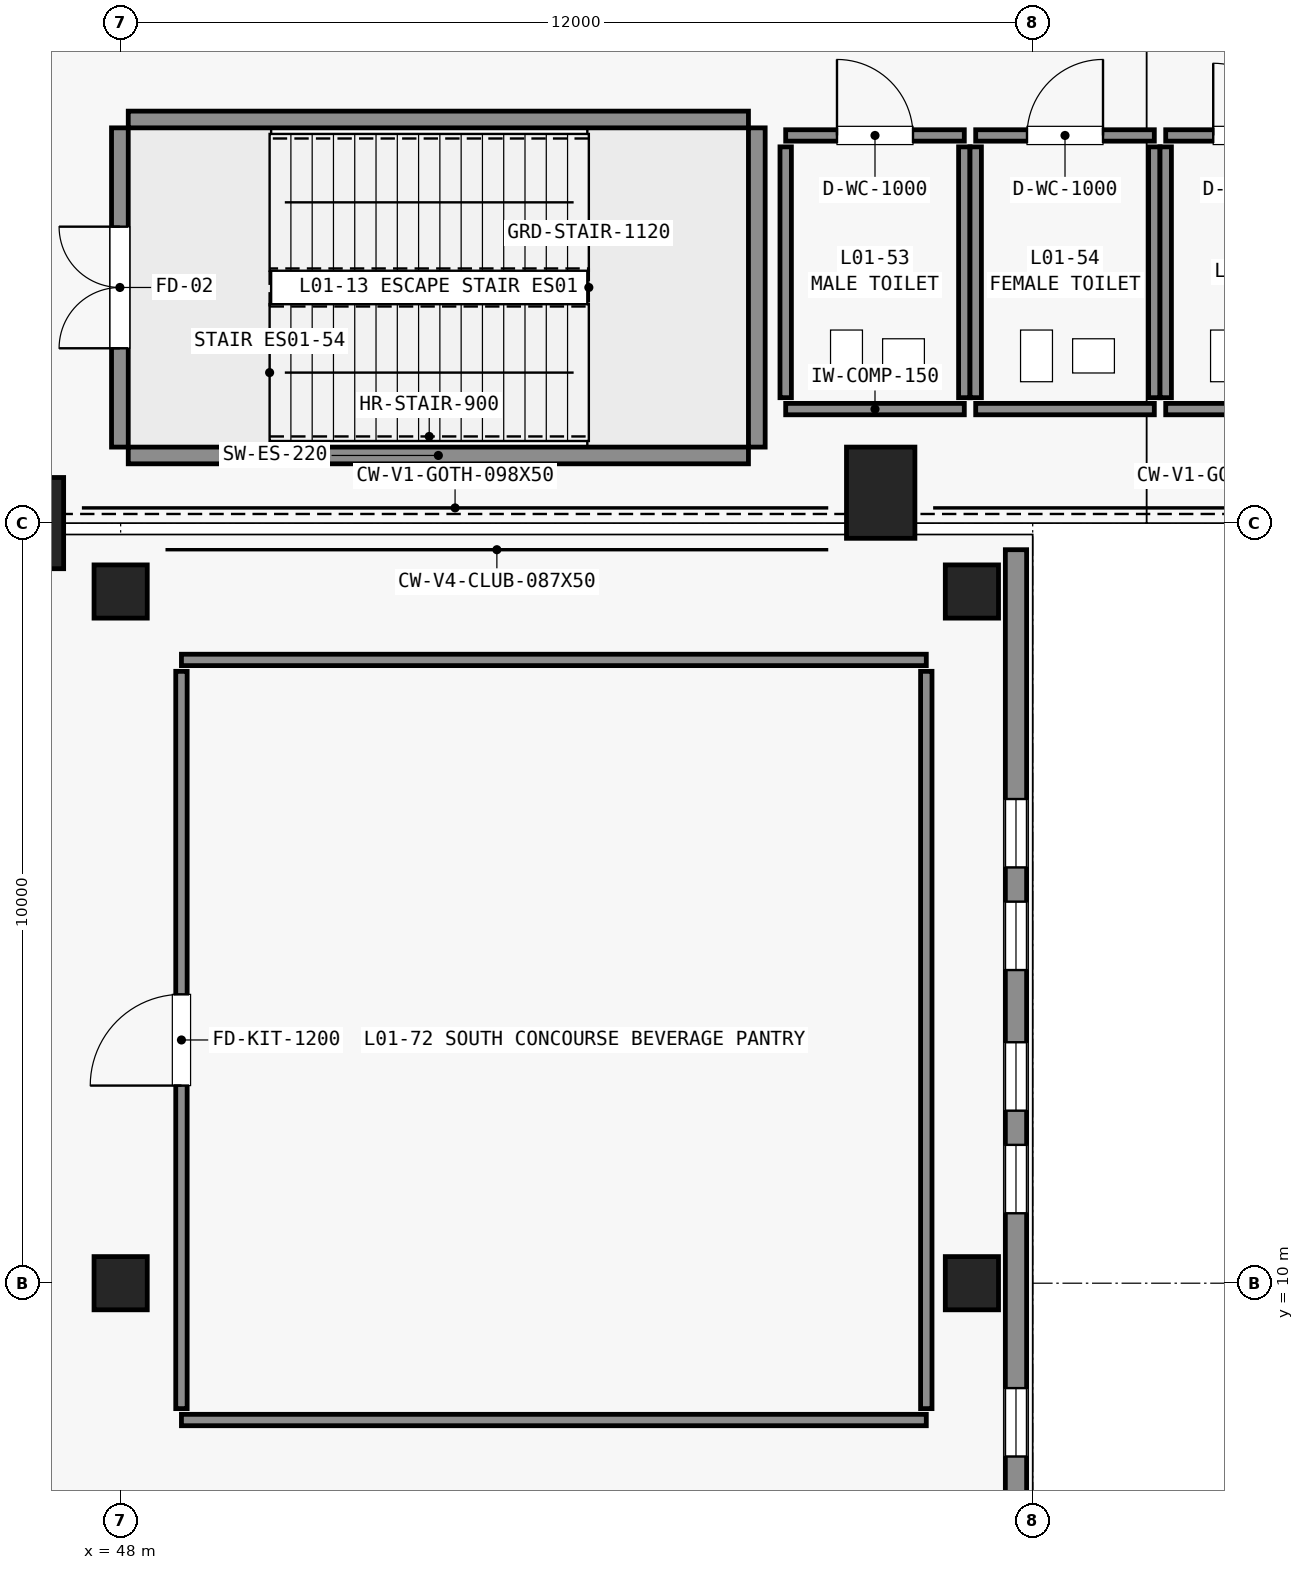
"""IFC4 building model, lengths in metres.
Left out: names, types, materials, properties, quantities, classifications, styles, units other than length and angle.
Written with IfcOpenShell. Run it as: python <this file> out.ifc"""

import sys

from ifc_helpers import new_model, si_unit, direction, frame, frame_2d, origin, origin_2d, place, context, subcontext, project, spatial, rectangle, extrude, element, fill, save


model = new_model("IFC4")
c1 = context("Model", 3, precision=1e-05, world=origin(), true_north=direction((0.0, 1.0)))
c2 = subcontext(c1, "Body", "Model", "MODEL_VIEW")
j1 = project(units=[si_unit("LENGTHUNIT", "METRE"), si_unit("PLANEANGLEUNIT", "RADIAN")], contexts=[c1])
p1 = place(None, origin())
s1 = spatial("IfcSite", under=j1, at=p1, CompositionType="ELEMENT")
p2 = place(p1, origin())
s2 = spatial("IfcBuilding", under=s1, at=p2, CompositionType="ELEMENT")
p3 = place(p2, frame((0.0, 0.0, 6.0)))
s3 = spatial("IfcBuildingStorey", under=s2, at=p3, CompositionType="ELEMENT", Elevation=6.0)
for number, where, z_axis, x_axis in (
    (1, (58.0, 20.4, 0.0), (0.0, 0.0, 1.0), (1.0, 0.0, 0.0)),
    (2, (46.8, 20.0, 0.0), (0.0, 0.0, 1.0), (1.0, 0.0, 0.0)),
):
    element("IfcColumn", number, at=place(p3, frame(where, z_axis=z_axis, x_axis=x_axis)), inside=s3, PredefinedType="PILASTER", context=c2, shape_type="SweptSolid", body=[
        extrude(rectangle(XDim=0.9, YDim=1.2, at=origin_2d()), origin(), (0.0, 0.0, 1.0), 5.4),
    ])
for number, where, z_axis, x_axis in (
    (3, (48.0, 10.0, 0.0), (0.0, 0.0, 1.0), (1.0, 0.0, 0.0)),
    (4, (48.0, 19.1, 0.0), (0.0, 0.0, 1.0), (1.0, 0.0, 0.0)),
    (5, (59.2, 10.0, 0.0), (0.0, 0.0, 1.0), (1.0, 0.0, 0.0)),
    (6, (59.2, 19.1, 0.0), (0.0, 0.0, 1.0), (1.0, 0.0, 0.0)),
):
    element("IfcColumn", number, at=place(p3, frame(where, z_axis=z_axis, x_axis=x_axis)), inside=s3, PredefinedType="COLUMN", context=c2, shape_type="SweptSolid", body=[
        extrude(rectangle(XDim=0.7, YDim=0.7, at=origin_2d()), origin(), (0.0, 0.0, 1.0), 5.4),
    ])
p4 = place(p3, frame((59.78, 0.22, 0.0), z_axis=(0.0, 0.0, 1.0), x_axis=(0.0, 1.0, 0.0)))
e7 = element("IfcWall", 7, at=p4, inside=s3, PredefinedType="STANDARD", context=c2, shape_type="SweptSolid", body=[
    extrude(rectangle(XDim=19.43, YDim=0.28, at=frame_2d((9.715, 0.0))), origin(), (0.0, 0.0, 1.0), 5.04),
])
p5 = place(p4, frame((2.45, 0.0, 0.95)))
e8 = element("IfcOpeningElement", 8, at=p5, cuts=e7, PredefinedType="OPENING", context=c2, shape_type="SweptSolid", body=[
    extrude(rectangle(XDim=0.9, YDim=2.85, at=frame_2d((0.45, 1.425))), frame((0.0, 0.15, 0.0), z_axis=(0.0, -1.0, 0.0), x_axis=(1.0, 0.0, 0.0)), (0.0, 0.0, 1.0), 0.3),
])
p6 = place(p4, frame((4.3, 0.0, 0.95)))
e9 = element("IfcOpeningElement", 9, at=p6, cuts=e7, PredefinedType="OPENING", context=c2, shape_type="SweptSolid", body=[
    extrude(rectangle(XDim=0.9, YDim=2.85, at=frame_2d((0.45, 1.425))), frame((0.0, 0.15, 0.0), z_axis=(0.0, -1.0, 0.0), x_axis=(1.0, 0.0, 0.0)), (0.0, 0.0, 1.0), 0.3),
])
p7 = place(p4, frame((5.65, 0.0, 0.95)))
e10 = element("IfcOpeningElement", 10, at=p7, cuts=e7, PredefinedType="OPENING", context=c2, shape_type="SweptSolid", body=[
    extrude(rectangle(XDim=0.9, YDim=2.85, at=frame_2d((0.45, 1.425))), frame((0.0, 0.15, 0.0), z_axis=(0.0, -1.0, 0.0), x_axis=(1.0, 0.0, 0.0)), (0.0, 0.0, 1.0), 0.3),
])
p8 = place(p4, frame((7.5, 0.0, 0.95)))
e11 = element("IfcOpeningElement", 11, at=p8, cuts=e7, PredefinedType="OPENING", context=c2, shape_type="SweptSolid", body=[
    extrude(rectangle(XDim=0.9, YDim=2.85, at=frame_2d((0.45, 1.425))), frame((0.0, 0.15, 0.0), z_axis=(0.0, -1.0, 0.0), x_axis=(1.0, 0.0, 0.0)), (0.0, 0.0, 1.0), 0.3),
])
p9 = place(p4, frame((10.7, 0.0, 0.95)))
e12 = element("IfcOpeningElement", 12, at=p9, cuts=e7, PredefinedType="OPENING", context=c2, shape_type="SweptSolid", body=[
    extrude(rectangle(XDim=0.9, YDim=2.85, at=frame_2d((0.45, 1.425))), frame((0.0, 0.15, 0.0), z_axis=(0.0, -1.0, 0.0), x_axis=(1.0, 0.0, 0.0)), (0.0, 0.0, 1.0), 0.3),
])
p10 = place(p4, frame((12.05, 0.0, 0.95)))
e13 = element("IfcOpeningElement", 13, at=p10, cuts=e7, PredefinedType="OPENING", context=c2, shape_type="SweptSolid", body=[
    extrude(rectangle(XDim=0.9, YDim=2.85, at=frame_2d((0.45, 1.425))), frame((0.0, 0.15, 0.0), z_axis=(0.0, -1.0, 0.0), x_axis=(1.0, 0.0, 0.0)), (0.0, 0.0, 1.0), 0.3),
])
p11 = place(p4, frame((13.9, 0.0, 0.95)))
e14 = element("IfcOpeningElement", 14, at=p11, cuts=e7, PredefinedType="OPENING", context=c2, shape_type="SweptSolid", body=[
    extrude(rectangle(XDim=0.9, YDim=2.85, at=frame_2d((0.45, 1.425))), frame((0.0, 0.15, 0.0), z_axis=(0.0, -1.0, 0.0), x_axis=(1.0, 0.0, 0.0)), (0.0, 0.0, 1.0), 0.3),
])
p12 = place(p4, frame((15.25, 0.0, 0.95)))
e15 = element("IfcOpeningElement", 15, at=p12, cuts=e7, PredefinedType="OPENING", context=c2, shape_type="SweptSolid", body=[
    extrude(rectangle(XDim=0.9, YDim=2.85, at=frame_2d((0.45, 1.425))), frame((0.0, 0.15, 0.0), z_axis=(0.0, -1.0, 0.0), x_axis=(1.0, 0.0, 0.0)), (0.0, 0.0, 1.0), 0.3),
])
for number, where, z_axis, x_axis in (
    (16, (48.1, 20.89, 0.0), (0.0, 0.0, 1.0), (1.0, 0.0, 0.0)),
    (17, (48.1, 25.31, 0.0), (0.0, 0.0, 1.0), (1.0, 0.0, 0.0)),
):
    element("IfcWall", number, at=place(p3, frame(where, z_axis=z_axis, x_axis=x_axis)), inside=s3, PredefinedType="SHEAR", context=c2, shape_type="SweptSolid", body=[
        extrude(rectangle(XDim=8.16, YDim=0.22, at=frame_2d((4.08, 0.0))), origin(), (0.0, 0.0, 1.0), 5.4),
    ])
p13 = place(p3, frame((47.99, 21.0, 0.0), z_axis=(0.0, 0.0, 1.0), x_axis=(0.0, 1.0, 0.0)))
e18 = element("IfcWall", 18, at=p13, inside=s3, PredefinedType="SHEAR", context=c2, shape_type="SweptSolid", body=[
    extrude(rectangle(XDim=4.2, YDim=0.22, at=frame_2d((2.1, 0.0))), origin(), (0.0, 0.0, 1.0), 5.4),
])
p14 = place(p13, frame((1.3, 0.0, 0.0)))
e19 = element("IfcOpeningElement", 19, at=p14, cuts=e18, PredefinedType="OPENING", context=c2, shape_type="SweptSolid", body=[
    extrude(rectangle(XDim=1.6, YDim=2.2, at=frame_2d((0.8, 1.1))), frame((0.0, 0.12, 0.0), z_axis=(0.0, -1.0, 0.0), x_axis=(1.0, 0.0, 0.0)), (0.0, 0.0, 1.0), 0.24),
])
p15 = place(p3, frame((56.37, 21.0, 0.0), z_axis=(0.0, 0.0, 1.0), x_axis=(0.0, 1.0, 0.0)))
e20 = element("IfcWall", 20, at=p15, inside=s3, PredefinedType="SHEAR", context=c2, shape_type="SweptSolid", body=[
    extrude(rectangle(XDim=4.2, YDim=0.22, at=frame_2d((2.1, 0.0))), origin(), (0.0, 0.0, 1.0), 5.4),
])
p16 = place(p3, frame((56.75, 21.5, 0.0), z_axis=(0.0, 0.0, 1.0), x_axis=(1.0, 0.0, 0.0)))
e21 = element("IfcWall", 21, at=p16, inside=s3, PredefinedType="STANDARD", context=c2, shape_type="SweptSolid", body=[
    extrude(rectangle(XDim=2.35, YDim=0.15, at=frame_2d((1.175, 0.0))), origin(), (0.0, 0.0, 1.0), 5.04),
])
p17 = place(p3, frame((56.75, 25.1, 0.0), z_axis=(0.0, 0.0, 1.0), x_axis=(1.0, 0.0, 0.0)))
e22 = element("IfcWall", 22, at=p17, inside=s3, PredefinedType="STANDARD", context=c2, shape_type="SweptSolid", body=[
    extrude(rectangle(XDim=2.35, YDim=0.15, at=frame_2d((1.175, 0.0))), origin(), (0.0, 0.0, 1.0), 5.04),
])
p18 = place(p17, frame((0.675, 0.0, 0.0)))
e23 = element("IfcOpeningElement", 23, at=p18, cuts=e22, PredefinedType="OPENING", context=c2, shape_type="SweptSolid", body=[
    extrude(rectangle(XDim=1.0, YDim=2.15, at=frame_2d((0.5, 1.075))), frame((0.0, 0.085, 0.0), z_axis=(0.0, -1.0, 0.0), x_axis=(1.0, 0.0, 0.0)), (0.0, 0.0, 1.0), 0.17),
])
for number, where, z_axis, x_axis in (
    (24, (56.75, 21.65, 0.0), (0.0, 0.0, 1.0), (0.0, 1.0, 0.0)),
    (25, (59.1, 21.65, 0.0), (0.0, 0.0, 1.0), (0.0, 1.0, 0.0)),
):
    element("IfcWall", number, at=place(p3, frame(where, z_axis=z_axis, x_axis=x_axis)), inside=s3, PredefinedType="STANDARD", context=c2, shape_type="SweptSolid", body=[
        extrude(rectangle(XDim=3.3, YDim=0.15, at=frame_2d((1.65, 0.0))), origin(), (0.0, 0.0, 1.0), 5.04),
    ])
p19 = place(p3, frame((59.25, 21.5, 0.0), z_axis=(0.0, 0.0, 1.0), x_axis=(1.0, 0.0, 0.0)))
e26 = element("IfcWall", 26, at=p19, inside=s3, PredefinedType="STANDARD", context=c2, shape_type="SweptSolid", body=[
    extrude(rectangle(XDim=2.35, YDim=0.15, at=frame_2d((1.175, 0.0))), origin(), (0.0, 0.0, 1.0), 5.04),
])
p20 = place(p3, frame((59.25, 25.1, 0.0), z_axis=(0.0, 0.0, 1.0), x_axis=(1.0, 0.0, 0.0)))
e27 = element("IfcWall", 27, at=p20, inside=s3, PredefinedType="STANDARD", context=c2, shape_type="SweptSolid", body=[
    extrude(rectangle(XDim=2.35, YDim=0.15, at=frame_2d((1.175, 0.0))), origin(), (0.0, 0.0, 1.0), 5.04),
])
p21 = place(p20, frame((0.675, 0.0, 0.0)))
e28 = element("IfcOpeningElement", 28, at=p21, cuts=e27, PredefinedType="OPENING", context=c2, shape_type="SweptSolid", body=[
    extrude(rectangle(XDim=1.0, YDim=2.15, at=frame_2d((0.5, 1.075))), frame((0.0, 0.085, 0.0), z_axis=(0.0, -1.0, 0.0), x_axis=(1.0, 0.0, 0.0)), (0.0, 0.0, 1.0), 0.17),
])
for number, where, z_axis, x_axis in (
    (29, (59.25, 21.65, 0.0), (0.0, 0.0, 1.0), (0.0, 1.0, 0.0)),
    (30, (61.6, 21.65, 0.0), (0.0, 0.0, 1.0), (0.0, 1.0, 0.0)),
):
    element("IfcWall", number, at=place(p3, frame(where, z_axis=z_axis, x_axis=x_axis)), inside=s3, PredefinedType="STANDARD", context=c2, shape_type="SweptSolid", body=[
        extrude(rectangle(XDim=3.3, YDim=0.15, at=frame_2d((1.65, 0.0))), origin(), (0.0, 0.0, 1.0), 5.04),
    ])
p22 = place(p3, frame((61.75, 21.5, 0.0), z_axis=(0.0, 0.0, 1.0), x_axis=(1.0, 0.0, 0.0)))
e31 = element("IfcWall", 31, at=p22, inside=s3, PredefinedType="STANDARD", context=c2, shape_type="SweptSolid", body=[
    extrude(rectangle(XDim=2.2, YDim=0.15, at=frame_2d((1.1, 0.0))), origin(), (0.0, 0.0, 1.0), 5.04),
])
p23 = place(p3, frame((61.75, 25.1, 0.0), z_axis=(0.0, 0.0, 1.0), x_axis=(1.0, 0.0, 0.0)))
e32 = element("IfcWall", 32, at=p23, inside=s3, PredefinedType="STANDARD", context=c2, shape_type="SweptSolid", body=[
    extrude(rectangle(XDim=2.2, YDim=0.15, at=frame_2d((1.1, 0.0))), origin(), (0.0, 0.0, 1.0), 5.04),
])
p24 = place(p23, frame((0.625, 0.0, 0.0)))
e33 = element("IfcOpeningElement", 33, at=p24, cuts=e32, PredefinedType="OPENING", context=c2, shape_type="SweptSolid", body=[
    extrude(rectangle(XDim=0.95, YDim=2.15, at=frame_2d((0.475, 1.075))), frame((0.0, 0.085, 0.0), z_axis=(0.0, -1.0, 0.0), x_axis=(1.0, 0.0, 0.0)), (0.0, 0.0, 1.0), 0.17),
])
p25 = place(p3, frame((61.75, 21.65, 0.0), z_axis=(0.0, 0.0, 1.0), x_axis=(0.0, 1.0, 0.0)))
e34 = element("IfcWall", 34, at=p25, inside=s3, PredefinedType="STANDARD", context=c2, shape_type="SweptSolid", body=[
    extrude(rectangle(XDim=3.3, YDim=0.15, at=frame_2d((1.65, 0.0))), origin(), (0.0, 0.0, 1.0), 5.04),
])
for number, where, z_axis, x_axis in (
    (35, (48.8, 8.2, 0.0), (0.0, 0.0, 1.0), (1.0, 0.0, 0.0)),
    (36, (48.8, 18.2, 0.0), (0.0, 0.0, 1.0), (1.0, 0.0, 0.0)),
):
    element("IfcWall", number, at=place(p3, frame(where, z_axis=z_axis, x_axis=x_axis)), inside=s3, PredefinedType="STANDARD", context=c2, shape_type="SweptSolid", body=[
        extrude(rectangle(XDim=9.8, YDim=0.15, at=frame_2d((4.9, 0.0))), origin(), (0.0, 0.0, 1.0), 4.29),
    ])
p26 = place(p3, frame((48.8, 8.35, 0.0), z_axis=(0.0, 0.0, 1.0), x_axis=(0.0, 1.0, 0.0)))
e37 = element("IfcWall", 37, at=p26, inside=s3, PredefinedType="STANDARD", context=c2, shape_type="SweptSolid", body=[
    extrude(rectangle(XDim=9.7, YDim=0.15, at=frame_2d((4.85, 0.0))), origin(), (0.0, 0.0, 1.0), 4.29),
])
p27 = place(p26, frame((4.25, 0.0, 0.0)))
e38 = element("IfcOpeningElement", 38, at=p27, cuts=e37, PredefinedType="OPENING", context=c2, shape_type="SweptSolid", body=[
    extrude(rectangle(XDim=1.2, YDim=2.2, at=frame_2d((0.6, 1.1))), frame((0.0, 0.085, 0.0), z_axis=(0.0, -1.0, 0.0), x_axis=(1.0, 0.0, 0.0)), (0.0, 0.0, 1.0), 0.17),
])
p28 = place(p3, frame((58.6, 8.35, 0.0), z_axis=(0.0, 0.0, 1.0), x_axis=(0.0, 1.0, 0.0)))
e39 = element("IfcWall", 39, at=p28, inside=s3, PredefinedType="STANDARD", context=c2, shape_type="SweptSolid", body=[
    extrude(rectangle(XDim=9.7, YDim=0.15, at=frame_2d((4.85, 0.0))), origin(), (0.0, 0.0, 1.0), 4.29),
])
p29 = place(p8, origin())
e40 = element("IfcWindow", 40, at=p29, inside=s3, PartitioningType="DOUBLE_PANEL_VERTICAL", PredefinedType="WINDOW", context=c2, shape_type="SweptSolid", body=[
    extrude(rectangle(XDim=0.9, YDim=2.85, at=frame_2d((0.45, 1.425))), frame((0.0, 0.03, 0.0), z_axis=(0.0, -1.0, 0.0), x_axis=(1.0, 0.0, 0.0)), (0.0, 0.0, 1.0), 0.06),
])
fill(e11, e40)
p30 = place(p9, origin())
e41 = element("IfcWindow", 41, at=p30, inside=s3, PartitioningType="DOUBLE_PANEL_VERTICAL", PredefinedType="WINDOW", context=c2, shape_type="SweptSolid", body=[
    extrude(rectangle(XDim=0.9, YDim=2.85, at=frame_2d((0.45, 1.425))), frame((0.0, 0.03, 0.0), z_axis=(0.0, -1.0, 0.0), x_axis=(1.0, 0.0, 0.0)), (0.0, 0.0, 1.0), 0.06),
])
fill(e12, e41)
p31 = place(p10, origin())
e42 = element("IfcWindow", 42, at=p31, inside=s3, PartitioningType="DOUBLE_PANEL_VERTICAL", PredefinedType="WINDOW", context=c2, shape_type="SweptSolid", body=[
    extrude(rectangle(XDim=0.9, YDim=2.85, at=frame_2d((0.45, 1.425))), frame((0.0, 0.03, 0.0), z_axis=(0.0, -1.0, 0.0), x_axis=(1.0, 0.0, 0.0)), (0.0, 0.0, 1.0), 0.06),
])
fill(e13, e42)
p32 = place(p11, origin())
e43 = element("IfcWindow", 43, at=p32, inside=s3, PartitioningType="DOUBLE_PANEL_VERTICAL", PredefinedType="WINDOW", context=c2, shape_type="SweptSolid", body=[
    extrude(rectangle(XDim=0.9, YDim=2.85, at=frame_2d((0.45, 1.425))), frame((0.0, 0.03, 0.0), z_axis=(0.0, -1.0, 0.0), x_axis=(1.0, 0.0, 0.0)), (0.0, 0.0, 1.0), 0.06),
])
fill(e14, e43)
p33 = place(p12, origin())
e44 = element("IfcWindow", 44, at=p33, inside=s3, PartitioningType="DOUBLE_PANEL_VERTICAL", PredefinedType="WINDOW", context=c2, shape_type="SweptSolid", body=[
    extrude(rectangle(XDim=0.9, YDim=2.85, at=frame_2d((0.45, 1.425))), frame((0.0, 0.03, 0.0), z_axis=(0.0, -1.0, 0.0), x_axis=(1.0, 0.0, 0.0)), (0.0, 0.0, 1.0), 0.06),
])
fill(e15, e44)
p34 = place(p14, origin())
e45 = element("IfcDoor", 45, at=p34, inside=s3, OperationType="DOUBLE_DOOR_SINGLE_SWING", PredefinedType="DOOR", context=c2, shape_type="SweptSolid", body=[
    extrude(rectangle(XDim=1.6, YDim=2.2, at=frame_2d((0.8, 1.1))), frame((0.0, 0.025, 0.0), z_axis=(0.0, -1.0, 0.0), x_axis=(1.0, 0.0, 0.0)), (0.0, 0.0, 1.0), 0.05),
])
fill(e19, e45)
p35 = place(p18, origin())
e46 = element("IfcDoor", 46, at=p35, inside=s3, OperationType="SINGLE_SWING_LEFT", PredefinedType="DOOR", context=c2, shape_type="SweptSolid", body=[
    extrude(rectangle(XDim=1.0, YDim=2.15, at=frame_2d((0.5, 1.075))), frame((0.0, 0.025, 0.0), z_axis=(0.0, -1.0, 0.0), x_axis=(1.0, 0.0, 0.0)), (0.0, 0.0, 1.0), 0.05),
])
fill(e23, e46)
p36 = place(p21, origin())
e47 = element("IfcDoor", 47, at=p36, inside=s3, OperationType="SINGLE_SWING_RIGHT", PredefinedType="DOOR", context=c2, shape_type="SweptSolid", body=[
    extrude(rectangle(XDim=1.0, YDim=2.15, at=frame_2d((0.5, 1.075))), frame((0.0, 0.025, 0.0), z_axis=(0.0, -1.0, 0.0), x_axis=(1.0, 0.0, 0.0)), (0.0, 0.0, 1.0), 0.05),
])
fill(e28, e47)
p37 = place(p24, origin())
e48 = element("IfcDoor", 48, at=p37, inside=s3, OperationType="SINGLE_SWING_LEFT", PredefinedType="DOOR", context=c2, shape_type="SweptSolid", body=[
    extrude(rectangle(XDim=0.95, YDim=2.15, at=frame_2d((0.475, 1.075))), frame((0.0, 0.025, 0.0), z_axis=(0.0, -1.0, 0.0), x_axis=(1.0, 0.0, 0.0)), (0.0, 0.0, 1.0), 0.05),
])
fill(e33, e48)
p38 = place(p27, origin())
e49 = element("IfcDoor", 49, at=p38, inside=s3, OperationType="SINGLE_SWING_LEFT", PredefinedType="DOOR", context=c2, shape_type="SweptSolid", body=[
    extrude(rectangle(XDim=1.2, YDim=2.2, at=frame_2d((0.6, 1.1))), frame((0.0, 0.025, 0.0), z_axis=(0.0, -1.0, 0.0), x_axis=(1.0, 0.0, 0.0)), (0.0, 0.0, 1.0), 0.05),
])
fill(e38, e49)
save(model, sys.argv[1])
